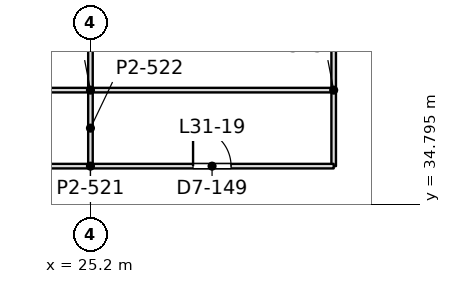
"""IFC4 building model, lengths in metres.
Left out: names, types, materials, properties, quantities, classifications, styles, units other than length and angle.
Written with IfcOpenShell. Run it as: python <this file> out.ifc"""

import sys

from ifc_helpers import new_model, si_unit, direction, frame, frame_2d, origin, place, context, subcontext, project, spatial, rectangle, extrude, element, fill, save


model = new_model("IFC4")
c1 = context("Model", 3, precision=1e-05, world=origin(), true_north=direction((0.0, 1.0)))
c2 = subcontext(c1, "Body", "Model", "MODEL_VIEW")
j1 = project(units=[si_unit("LENGTHUNIT", "METRE"), si_unit("PLANEANGLEUNIT", "RADIAN")], contexts=[c1])
p1 = place(None, origin())
s1 = spatial("IfcSite", under=j1, at=p1, CompositionType="ELEMENT")
p2 = place(p1, origin())
s2 = spatial("IfcBuilding", under=s1, at=p2, CompositionType="ELEMENT")
p3 = place(p2, frame((0.0, 0.0, 138.6)))
s3 = spatial("IfcBuildingStorey", under=s2, at=p3, CompositionType="ELEMENT", Elevation=138.6)
p4 = place(p3, frame((25.2, 37.858, 0.0), z_axis=(0.0, 0.0, 1.0), x_axis=(0.0, 1.0, 0.0)))
e1 = element("IfcWall", 1, at=p4, inside=s3, PredefinedType="PARTITIONING", context=c2, shape_type="SweptSolid", body=[
    extrude(rectangle(XDim=3.443, YDim=0.12, at=frame_2d((1.722, 0.0))), origin(), (0.0, 0.0, 1.0), 3.55),
])
p5 = place(p3, frame((31.6, 35.8, 0.0), z_axis=(0.0, 0.0, 1.0), x_axis=(0.0, 1.0, 0.0)))
e2 = element("IfcWall", 2, at=p5, inside=s3, PredefinedType="PARTITIONING", context=c2, shape_type="SweptSolid", body=[
    extrude(rectangle(XDim=4.0, YDim=0.12, at=frame_2d((2.0, 0.0))), origin(), (0.0, 0.0, 1.0), 4.05),
])
p6 = place(p3, frame((25.2, 35.858, 0.0), z_axis=(0.0, 0.0, 1.0), x_axis=(0.0, 1.0, 0.0)))
e3 = element("IfcWall", 3, at=p6, inside=s3, PredefinedType="PARTITIONING", context=c2, shape_type="SweptSolid", body=[
    extrude(rectangle(XDim=1.884, YDim=0.12, at=frame_2d((0.942, 0.0))), origin(), (0.0, 0.0, 1.0), 3.55),
])
p7 = place(p3, frame((18.8, 35.8, 0.0), z_axis=(0.0, 0.0, 1.0), x_axis=(1.0, 0.0, 0.0)))
e4 = element("IfcWall", 4, at=p7, inside=s3, PredefinedType="PARTITIONING", context=c2, shape_type="SweptSolid", body=[
    extrude(rectangle(XDim=12.8, YDim=0.12, at=frame_2d((6.4, 0.0))), origin(), (0.0, 0.0, 1.0), 3.55),
])
p8 = place(p7, frame((2.7, 0.0, 0.0)))
e5 = element("IfcOpeningElement", 5, at=p8, cuts=e4, PredefinedType="OPENING", context=c2, shape_type="SweptSolid", body=[
    extrude(rectangle(XDim=1.0, YDim=2.4, at=frame_2d((0.5, 1.2))), frame((0.0, 0.07, 0.0), z_axis=(0.0, -1.0, 0.0), x_axis=(1.0, 0.0, 0.0)), (0.0, 0.0, 1.0), 0.14),
])
p9 = place(p7, frame((9.1, 0.0, 0.0)))
e6 = element("IfcOpeningElement", 6, at=p9, cuts=e4, PredefinedType="OPENING", context=c2, shape_type="SweptSolid", body=[
    extrude(rectangle(XDim=1.0, YDim=2.4, at=frame_2d((0.5, 1.2))), frame((0.0, 0.07, 0.0), z_axis=(0.0, -1.0, 0.0), x_axis=(1.0, 0.0, 0.0)), (0.0, 0.0, 1.0), 0.14),
])
p10 = place(p3, frame((18.858, 37.8, 0.0), z_axis=(0.0, 0.0, 1.0), x_axis=(1.0, 0.0, 0.0)))
e7 = element("IfcWall", 7, at=p10, inside=s3, PredefinedType="PARTITIONING", context=c2, shape_type="SweptSolid", body=[
    extrude(rectangle(XDim=12.684, YDim=0.12, at=frame_2d((6.342, 0.0))), origin(), (0.0, 0.0, 1.0), 3.55),
])
p11 = place(p9, origin())
e8 = element("IfcDoor", 8, at=p11, inside=s3, OperationType="SINGLE_SWING_LEFT", PredefinedType="DOOR", context=c2, shape_type="SweptSolid", body=[
    extrude(rectangle(XDim=1.0, YDim=2.4, at=frame_2d((0.5, 1.2))), frame((0.0, 0.025, 0.0), z_axis=(0.0, -1.0, 0.0), x_axis=(1.0, 0.0, 0.0)), (0.0, 0.0, 1.0), 0.05),
])
fill(e6, e8)
save(model, sys.argv[1])
